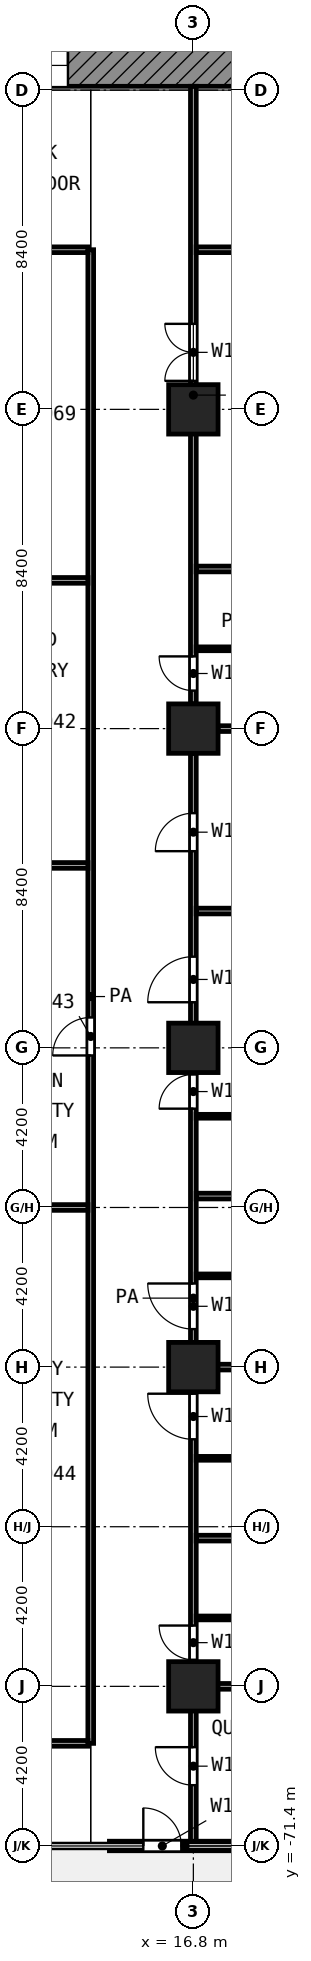
"""IFC4 building model, lengths in metres.
Left out: names, types, materials, properties, quantities, classifications, styles, units other than length and angle.
Written with IfcOpenShell. Run it as: python <this file> out.ifc"""

import sys

from ifc_helpers import new_model, si_unit, direction, frame, frame_2d, origin, origin_2d, place, context, subcontext, project, spatial, rectangle, extrude, element, fill, save


model = new_model("IFC4")
c1 = context("Model", 3, precision=1e-05, world=origin(), true_north=direction((0.0, 1.0)))
c2 = subcontext(c1, "Body", "Model", "MODEL_VIEW")
j1 = project(units=[si_unit("LENGTHUNIT", "METRE"), si_unit("PLANEANGLEUNIT", "RADIAN")], contexts=[c1])
p1 = place(None, origin())
s1 = spatial("IfcSite", under=j1, at=p1, CompositionType="ELEMENT")
p2 = place(p1, origin())
s2 = spatial("IfcBuilding", under=s1, at=p2, CompositionType="ELEMENT")
p3 = place(p2, frame((0.0, 0.0, 56.0)))
s3 = spatial("IfcBuildingStorey", under=s2, at=p3, CompositionType="ELEMENT", Elevation=56.0)
for number, where, z_axis, x_axis in (
    (1, (16.8, -33.6, 0.0), (0.0, 0.0, 1.0), (1.0, 0.0, 0.0)),
    (2, (16.8, -42.0, 0.0), (0.0, 0.0, 1.0), (1.0, 0.0, 0.0)),
    (3, (16.8, -50.4, 0.0), (0.0, 0.0, 1.0), (1.0, 0.0, 0.0)),
    (4, (16.8, -58.8, 0.0), (0.0, 0.0, 1.0), (1.0, 0.0, 0.0)),
    (5, (16.8, -67.2, 0.0), (0.0, 0.0, 1.0), (1.0, 0.0, 0.0)),
):
    element("IfcColumn", number, at=place(p3, frame(where, z_axis=z_axis, x_axis=x_axis)), inside=s3, PredefinedType="COLUMN", context=c2, shape_type="SweptSolid", body=[
        extrude(rectangle(XDim=1.3, YDim=1.3, at=origin_2d()), origin(), (0.0, 0.0, 1.0), 4.2),
    ])
p4 = place(p3, frame((14.592, -71.4, 0.0), z_axis=(0.0, 0.0, 1.0), x_axis=(1.0, 0.0, 0.0)))
e6 = element("IfcWall", 6, at=p4, inside=s3, PredefinedType="SOLIDWALL", context=c2, shape_type="SweptSolid", body=[
    extrude(rectangle(XDim=3.983, YDim=0.25, at=frame_2d((1.992, 0.0))), origin(), (0.0, 0.0, 1.0), 3.78),
])
p5 = place(p4, frame((0.892, 0.0, 0.0)))
e7 = element("IfcOpeningElement", 7, at=p5, cuts=e6, PredefinedType="OPENING", context=c2, shape_type="SweptSolid", body=[
    extrude(rectangle(XDim=1.0, YDim=2.1, at=frame_2d((0.5, 1.05))), frame((0.0, 0.135, 0.0), z_axis=(0.0, -1.0, 0.0), x_axis=(1.0, 0.0, 0.0)), (0.0, 0.0, 1.0), 0.27),
])
p6 = place(p3, frame((5.4, -24.55, 0.0), z_axis=(0.0, 0.0, 1.0), x_axis=(1.0, 0.0, 0.0)))
e8 = element("IfcWall", 8, at=p6, inside=s3, PredefinedType="SHEAR", context=c2, shape_type="SweptSolid", body=[
    extrude(rectangle(XDim=18.6, YDim=1.1, at=frame_2d((9.3, 0.0))), origin(), (0.0, 0.0, 1.0), 3.9),
])
p7 = place(p6, frame((6.3, 0.0, 0.0)))
e9 = element("IfcOpeningElement", 9, at=p7, cuts=e8, PredefinedType="OPENING", context=c2, shape_type="SweptSolid", body=[
    extrude(rectangle(XDim=1.8, YDim=2.1, at=frame_2d((0.9, 1.05))), frame((0.0, 0.56, 0.0), z_axis=(0.0, -1.0, 0.0), x_axis=(1.0, 0.0, 0.0)), (0.0, 0.0, 1.0), 1.12),
])
for number, where, z_axis, x_axis in (
    (10, (16.875, -65.4, 0.0), (0.0, 0.0, 1.0), (1.0, 0.0, 0.0)),
    (11, (16.875, -61.2, 0.0), (0.0, 0.0, 1.0), (1.0, 0.0, 0.0)),
):
    element("IfcWall", number, at=place(p3, frame(where, z_axis=z_axis, x_axis=x_axis)), inside=s3, PredefinedType="PARTITIONING", context=c2, shape_type="SweptSolid", body=[
        extrude(rectangle(XDim=2.575, YDim=0.1, at=frame_2d((1.288, 0.0))), origin(), (0.0, 0.0, 1.0), 3.9),
    ])
p8 = place(p3, frame((16.875, -56.4, 0.0), z_axis=(0.0, 0.0, 1.0), x_axis=(1.0, 0.0, 0.0)))
e12 = element("IfcWall", 12, at=p8, inside=s3, PredefinedType="PARTITIONING", context=c2, shape_type="SweptSolid", body=[
    extrude(rectangle(XDim=3.175, YDim=0.1, at=frame_2d((1.587, 0.0))), origin(), (0.0, 0.0, 1.0), 3.9),
])
p9 = place(p3, frame((16.875, -52.2, 0.0), z_axis=(0.0, 0.0, 1.0), x_axis=(1.0, 0.0, 0.0)))
e13 = element("IfcWall", 13, at=p9, inside=s3, PredefinedType="PARTITIONING", context=c2, shape_type="SweptSolid", body=[
    extrude(rectangle(XDim=2.574, YDim=0.1, at=frame_2d((1.287, 0.0))), origin(), (0.0, 0.0, 1.0), 3.9),
])
p10 = place(p3, frame((16.875, -39.9, 0.0), z_axis=(0.0, 0.0, 1.0), x_axis=(1.0, 0.0, 0.0)))
e14 = element("IfcWall", 14, at=p10, inside=s3, PredefinedType="PARTITIONING", context=c2, shape_type="SweptSolid", body=[
    extrude(rectangle(XDim=2.575, YDim=0.1, at=frame_2d((1.288, 0.0))), origin(), (0.0, 0.0, 1.0), 3.9),
])
p11 = place(p3, frame((11.175, -68.7, 0.0), z_axis=(0.0, 0.0, 1.0), x_axis=(1.0, 0.0, 0.0)))
e15 = element("IfcWall", 15, at=p11, inside=s3, PredefinedType="PARTITIONING", context=c2, shape_type="SweptSolid", body=[
    extrude(rectangle(XDim=2.85, YDim=0.15, at=frame_2d((1.425, 0.0))), origin(), (0.0, 0.0, 1.0), 3.9),
])
p12 = place(p3, frame((16.875, -67.2, 0.0), z_axis=(0.0, 0.0, 1.0), x_axis=(1.0, 0.0, 0.0)))
e16 = element("IfcWall", 16, at=p12, inside=s3, PredefinedType="PARTITIONING", context=c2, shape_type="SweptSolid", body=[
    extrude(rectangle(XDim=6.412, YDim=0.15, at=frame_2d((3.206, 0.0))), origin(), (0.0, 0.0, 1.0), 3.9),
])
for number, where, z_axis, x_axis in (
    (17, (16.875, -63.3, 0.0), (0.0, 0.0, 1.0), (1.0, 0.0, 0.0)),
    (18, (16.875, -58.8, 0.0), (0.0, 0.0, 1.0), (1.0, 0.0, 0.0)),
):
    element("IfcWall", number, at=place(p3, frame(where, z_axis=z_axis, x_axis=x_axis)), inside=s3, PredefinedType="PARTITIONING", context=c2, shape_type="SweptSolid", body=[
        extrude(rectangle(XDim=8.245, YDim=0.15, at=frame_2d((4.123, 0.0))), origin(), (0.0, 0.0, 1.0), 3.9),
    ])
p13 = place(p3, frame((11.175, -54.6, 0.0), z_axis=(0.0, 0.0, 1.0), x_axis=(1.0, 0.0, 0.0)))
e19 = element("IfcWall", 19, at=p13, inside=s3, PredefinedType="PARTITIONING", context=c2, shape_type="SweptSolid", body=[
    extrude(rectangle(XDim=2.85, YDim=0.15, at=frame_2d((1.425, 0.0))), origin(), (0.0, 0.0, 1.0), 3.9),
])
for number, where, z_axis, x_axis in (
    (20, (16.875, -54.3, 0.0), (0.0, 0.0, 1.0), (1.0, 0.0, 0.0)),
    (21, (16.875, -46.8, 0.0), (0.0, 0.0, 1.0), (1.0, 0.0, 0.0)),
):
    element("IfcWall", number, at=place(p3, frame(where, z_axis=z_axis, x_axis=x_axis)), inside=s3, PredefinedType="PARTITIONING", context=c2, shape_type="SweptSolid", body=[
        extrude(rectangle(XDim=8.245, YDim=0.15, at=frame_2d((4.123, 0.0))), origin(), (0.0, 0.0, 1.0), 3.9),
    ])
p14 = place(p3, frame((11.175, -45.6, 0.0), z_axis=(0.0, 0.0, 1.0), x_axis=(1.0, 0.0, 0.0)))
e22 = element("IfcWall", 22, at=p14, inside=s3, PredefinedType="PARTITIONING", context=c2, shape_type="SweptSolid", body=[
    extrude(rectangle(XDim=2.85, YDim=0.15, at=frame_2d((1.425, 0.0))), origin(), (0.0, 0.0, 1.0), 3.9),
])
p15 = place(p3, frame((17.45, -42.0, 0.0), z_axis=(0.0, 0.0, 1.0), x_axis=(1.0, 0.0, 0.0)))
e23 = element("IfcWall", 23, at=p15, inside=s3, PredefinedType="PARTITIONING", context=c2, shape_type="SweptSolid", body=[
    extrude(rectangle(XDim=7.15, YDim=0.15, at=frame_2d((3.575, 0.0))), origin(), (0.0, 0.0, 1.0), 3.9),
])
p16 = place(p3, frame((11.175, -38.1, 0.0), z_axis=(0.0, 0.0, 1.0), x_axis=(1.0, 0.0, 0.0)))
e24 = element("IfcWall", 24, at=p16, inside=s3, PredefinedType="PARTITIONING", context=c2, shape_type="SweptSolid", body=[
    extrude(rectangle(XDim=2.85, YDim=0.15, at=frame_2d((1.425, 0.0))), origin(), (0.0, 0.0, 1.0), 3.9),
])
p17 = place(p3, frame((16.875, -37.8, 0.0), z_axis=(0.0, 0.0, 1.0), x_axis=(1.0, 0.0, 0.0)))
e25 = element("IfcWall", 25, at=p17, inside=s3, PredefinedType="PARTITIONING", context=c2, shape_type="SweptSolid", body=[
    extrude(rectangle(XDim=8.245, YDim=0.15, at=frame_2d((4.123, 0.0))), origin(), (0.0, 0.0, 1.0), 3.9),
])
p18 = place(p3, frame((11.175, -29.4, 0.0), z_axis=(0.0, 0.0, 1.0), x_axis=(1.0, 0.0, 0.0)))
e26 = element("IfcWall", 26, at=p18, inside=s3, PredefinedType="PARTITIONING", context=c2, shape_type="SweptSolid", body=[
    extrude(rectangle(XDim=2.85, YDim=0.15, at=frame_2d((1.425, 0.0))), origin(), (0.0, 0.0, 1.0), 3.9),
])
p19 = place(p3, frame((16.875, -29.4, 0.0), z_axis=(0.0, 0.0, 1.0), x_axis=(1.0, 0.0, 0.0)))
e27 = element("IfcWall", 27, at=p19, inside=s3, PredefinedType="PARTITIONING", context=c2, shape_type="SweptSolid", body=[
    extrude(rectangle(XDim=8.25, YDim=0.15, at=frame_2d((4.125, 0.0))), origin(), (0.0, 0.0, 1.0), 3.9),
])
p20 = place(p3, frame((14.1, -68.7, 0.0), z_axis=(0.0, 0.0, 1.0), x_axis=(0.0, 1.0, 0.0)))
e28 = element("IfcWall", 28, at=p20, inside=s3, PredefinedType="PARTITIONING", context=c2, shape_type="SweptSolid", body=[
    extrude(rectangle(XDim=39.3, YDim=0.15, at=frame_2d((19.65, 0.0))), origin(), (0.0, 0.0, 1.0), 3.9),
])
p21 = place(p20, frame((18.1, 0.0, 0.0)))
e29 = element("IfcOpeningElement", 29, at=p21, cuts=e28, PredefinedType="OPENING", context=c2, shape_type="SweptSolid", body=[
    extrude(rectangle(XDim=1.0, YDim=2.1, at=frame_2d((0.5, 1.05))), frame((0.0, 0.085, 0.0), z_axis=(0.0, -1.0, 0.0), x_axis=(1.0, 0.0, 0.0)), (0.0, 0.0, 1.0), 0.17),
])
p22 = place(p3, frame((16.8, -71.32, 0.0), z_axis=(0.0, 0.0, 1.0), x_axis=(0.0, 1.0, 0.0)))
e30 = element("IfcWall", 30, at=p22, inside=s3, PredefinedType="PARTITIONING", context=c2, shape_type="SweptSolid", body=[
    extrude(rectangle(XDim=28.67, YDim=0.15, at=frame_2d((14.335, 0.0))), origin(), (0.0, 0.0, 1.0), 3.9),
])
p23 = place(p22, frame((26.095, 0.0, 0.0)))
e31 = element("IfcOpeningElement", 31, at=p23, cuts=e30, PredefinedType="OPENING", context=c2, shape_type="SweptSolid", body=[
    extrude(rectangle(XDim=1.0, YDim=2.1, at=frame_2d((0.5, 1.05))), frame((0.0, 0.085, 0.0), z_axis=(0.0, -1.0, 0.0), x_axis=(1.0, 0.0, 0.0)), (0.0, 0.0, 1.0), 0.17),
])
p24 = place(p22, frame((22.12, 0.0, 0.0)))
e32 = element("IfcOpeningElement", 32, at=p24, cuts=e30, PredefinedType="OPENING", context=c2, shape_type="SweptSolid", body=[
    extrude(rectangle(XDim=1.2, YDim=2.1, at=frame_2d((0.6, 1.05))), frame((0.0, 0.085, 0.0), z_axis=(0.0, -1.0, 0.0), x_axis=(1.0, 0.0, 0.0)), (0.0, 0.0, 1.0), 0.17),
])
p25 = place(p22, frame((19.32, 0.0, 0.0)))
e33 = element("IfcOpeningElement", 33, at=p25, cuts=e30, PredefinedType="OPENING", context=c2, shape_type="SweptSolid", body=[
    extrude(rectangle(XDim=0.9, YDim=2.1, at=frame_2d((0.45, 1.05))), frame((0.0, 0.085, 0.0), z_axis=(0.0, -1.0, 0.0), x_axis=(1.0, 0.0, 0.0)), (0.0, 0.0, 1.0), 0.17),
])
p26 = place(p22, frame((13.52, 0.0, 0.0)))
e34 = element("IfcOpeningElement", 34, at=p26, cuts=e30, PredefinedType="OPENING", context=c2, shape_type="SweptSolid", body=[
    extrude(rectangle(XDim=1.2, YDim=2.1, at=frame_2d((0.6, 1.05))), frame((0.0, 0.085, 0.0), z_axis=(0.0, -1.0, 0.0), x_axis=(1.0, 0.0, 0.0)), (0.0, 0.0, 1.0), 0.17),
])
p27 = place(p22, frame((10.62, 0.0, 0.0)))
e35 = element("IfcOpeningElement", 35, at=p27, cuts=e30, PredefinedType="OPENING", context=c2, shape_type="SweptSolid", body=[
    extrude(rectangle(XDim=1.2, YDim=2.1, at=frame_2d((0.6, 1.05))), frame((0.0, 0.085, 0.0), z_axis=(0.0, -1.0, 0.0), x_axis=(1.0, 0.0, 0.0)), (0.0, 0.0, 1.0), 0.17),
])
p28 = place(p22, frame((4.82, 0.0, 0.0)))
e36 = element("IfcOpeningElement", 36, at=p28, cuts=e30, PredefinedType="OPENING", context=c2, shape_type="SweptSolid", body=[
    extrude(rectangle(XDim=0.9, YDim=2.1, at=frame_2d((0.45, 1.05))), frame((0.0, 0.085, 0.0), z_axis=(0.0, -1.0, 0.0), x_axis=(1.0, 0.0, 0.0)), (0.0, 0.0, 1.0), 0.17),
])
p29 = place(p22, frame((1.52, 0.0, 0.0)))
e37 = element("IfcOpeningElement", 37, at=p29, cuts=e30, PredefinedType="OPENING", context=c2, shape_type="SweptSolid", body=[
    extrude(rectangle(XDim=1.0, YDim=2.1, at=frame_2d((0.5, 1.05))), frame((0.0, 0.085, 0.0), z_axis=(0.0, -1.0, 0.0), x_axis=(1.0, 0.0, 0.0)), (0.0, 0.0, 1.0), 0.17),
])
p30 = place(p3, frame((16.8, -41.35, 0.0), z_axis=(0.0, 0.0, 1.0), x_axis=(0.0, 1.0, 0.0)))
e38 = element("IfcWall", 38, at=p30, inside=s3, PredefinedType="PARTITIONING", context=c2, shape_type="SweptSolid", body=[
    extrude(rectangle(XDim=16.25, YDim=0.15, at=frame_2d((8.125, 0.0))), origin(), (0.0, 0.0, 1.0), 3.9),
])
p31 = place(p30, frame((8.5, 0.0, 0.0)))
e39 = element("IfcOpeningElement", 39, at=p31, cuts=e38, PredefinedType="OPENING", context=c2, shape_type="SweptSolid", body=[
    extrude(rectangle(XDim=1.5, YDim=2.1, at=frame_2d((0.75, 1.05))), frame((0.0, 0.085, 0.0), z_axis=(0.0, -1.0, 0.0), x_axis=(1.0, 0.0, 0.0)), (0.0, 0.0, 1.0), 0.17),
])
p32 = place(p30, frame((0.35, 0.0, 0.0)))
e40 = element("IfcOpeningElement", 40, at=p32, cuts=e38, PredefinedType="OPENING", context=c2, shape_type="SweptSolid", body=[
    extrude(rectangle(XDim=0.9, YDim=2.1, at=frame_2d((0.45, 1.05))), frame((0.0, 0.085, 0.0), z_axis=(0.0, -1.0, 0.0), x_axis=(1.0, 0.0, 0.0)), (0.0, 0.0, 1.0), 0.17),
])
p33 = place(p5, origin())
e41 = element("IfcDoor", 41, at=p33, inside=s3, OperationType="SINGLE_SWING_LEFT", PredefinedType="DOOR", context=c2, shape_type="SweptSolid", body=[
    extrude(rectangle(XDim=1.0, YDim=2.1, at=frame_2d((0.5, 1.05))), frame((0.0, 0.025, 0.0), z_axis=(0.0, -1.0, 0.0), x_axis=(1.0, 0.0, 0.0)), (0.0, 0.0, 1.0), 0.05),
])
fill(e7, e41)
p34 = place(p7, origin())
e42 = element("IfcDoor", 42, at=p34, inside=s3, OperationType="DOUBLE_DOOR_SINGLE_SWING", PredefinedType="DOOR", context=c2, shape_type="SweptSolid", body=[
    extrude(rectangle(XDim=1.8, YDim=2.1, at=frame_2d((0.9, 1.05))), frame((0.0, 0.025, 0.0), z_axis=(0.0, -1.0, 0.0), x_axis=(1.0, 0.0, 0.0)), (0.0, 0.0, 1.0), 0.05),
])
fill(e9, e42)
p35 = place(p21, origin())
e43 = element("IfcDoor", 43, at=p35, inside=s3, OperationType="SINGLE_SWING_LEFT", PredefinedType="DOOR", context=c2, shape_type="SweptSolid", body=[
    extrude(rectangle(XDim=1.0, YDim=2.1, at=frame_2d((0.5, 1.05))), frame((0.0, 0.025, 0.0), z_axis=(0.0, -1.0, 0.0), x_axis=(1.0, 0.0, 0.0)), (0.0, 0.0, 1.0), 0.05),
])
fill(e29, e43)
p36 = place(p31, origin())
e44 = element("IfcDoor", 44, at=p36, inside=s3, OperationType="DOUBLE_DOOR_SINGLE_SWING", PredefinedType="DOOR", context=c2, shape_type="SweptSolid", body=[
    extrude(rectangle(XDim=1.5, YDim=2.1, at=frame_2d((0.75, 1.05))), frame((0.0, 0.025, 0.0), z_axis=(0.0, -1.0, 0.0), x_axis=(1.0, 0.0, 0.0)), (0.0, 0.0, 1.0), 0.05),
])
fill(e39, e44)
p37 = place(p32, origin())
e45 = element("IfcDoor", 45, at=p37, inside=s3, OperationType="SINGLE_SWING_RIGHT", PredefinedType="DOOR", context=c2, shape_type="SweptSolid", body=[
    extrude(rectangle(XDim=0.9, YDim=2.1, at=frame_2d((0.45, 1.05))), frame((0.0, 0.025, 0.0), z_axis=(0.0, -1.0, 0.0), x_axis=(1.0, 0.0, 0.0)), (0.0, 0.0, 1.0), 0.05),
])
fill(e40, e45)
p38 = place(p23, origin())
e46 = element("IfcDoor", 46, at=p38, inside=s3, OperationType="SINGLE_SWING_LEFT", PredefinedType="DOOR", context=c2, shape_type="SweptSolid", body=[
    extrude(rectangle(XDim=1.0, YDim=2.1, at=frame_2d((0.5, 1.05))), frame((0.0, 0.025, 0.0), z_axis=(0.0, -1.0, 0.0), x_axis=(1.0, 0.0, 0.0)), (0.0, 0.0, 1.0), 0.05),
])
fill(e31, e46)
p39 = place(p24, origin())
e47 = element("IfcDoor", 47, at=p39, inside=s3, OperationType="SINGLE_SWING_LEFT", PredefinedType="DOOR", context=c2, shape_type="SweptSolid", body=[
    extrude(rectangle(XDim=1.2, YDim=2.1, at=frame_2d((0.6, 1.05))), frame((0.0, 0.025, 0.0), z_axis=(0.0, -1.0, 0.0), x_axis=(1.0, 0.0, 0.0)), (0.0, 0.0, 1.0), 0.05),
])
fill(e32, e47)
p40 = place(p25, origin())
e48 = element("IfcDoor", 48, at=p40, inside=s3, OperationType="SINGLE_SWING_LEFT", PredefinedType="DOOR", context=c2, shape_type="SweptSolid", body=[
    extrude(rectangle(XDim=0.9, YDim=2.1, at=frame_2d((0.45, 1.05))), frame((0.0, 0.025, 0.0), z_axis=(0.0, -1.0, 0.0), x_axis=(1.0, 0.0, 0.0)), (0.0, 0.0, 1.0), 0.05),
])
fill(e33, e48)
p41 = place(p26, origin())
e49 = element("IfcDoor", 49, at=p41, inside=s3, OperationType="SINGLE_SWING_RIGHT", PredefinedType="DOOR", context=c2, shape_type="SweptSolid", body=[
    extrude(rectangle(XDim=1.2, YDim=2.1, at=frame_2d((0.6, 1.05))), frame((0.0, 0.025, 0.0), z_axis=(0.0, -1.0, 0.0), x_axis=(1.0, 0.0, 0.0)), (0.0, 0.0, 1.0), 0.05),
])
fill(e34, e49)
p42 = place(p27, origin())
e50 = element("IfcDoor", 50, at=p42, inside=s3, OperationType="SINGLE_SWING_RIGHT", PredefinedType="DOOR", context=c2, shape_type="SweptSolid", body=[
    extrude(rectangle(XDim=1.2, YDim=2.1, at=frame_2d((0.6, 1.05))), frame((0.0, 0.025, 0.0), z_axis=(0.0, -1.0, 0.0), x_axis=(1.0, 0.0, 0.0)), (0.0, 0.0, 1.0), 0.05),
])
fill(e35, e50)
p43 = place(p28, origin())
e51 = element("IfcDoor", 51, at=p43, inside=s3, OperationType="SINGLE_SWING_RIGHT", PredefinedType="DOOR", context=c2, shape_type="SweptSolid", body=[
    extrude(rectangle(XDim=0.9, YDim=2.1, at=frame_2d((0.45, 1.05))), frame((0.0, 0.025, 0.0), z_axis=(0.0, -1.0, 0.0), x_axis=(1.0, 0.0, 0.0)), (0.0, 0.0, 1.0), 0.05),
])
fill(e36, e51)
p44 = place(p29, origin())
e52 = element("IfcDoor", 52, at=p44, inside=s3, OperationType="SINGLE_SWING_RIGHT", PredefinedType="DOOR", context=c2, shape_type="SweptSolid", body=[
    extrude(rectangle(XDim=1.0, YDim=2.1, at=frame_2d((0.5, 1.05))), frame((0.0, 0.025, 0.0), z_axis=(0.0, -1.0, 0.0), x_axis=(1.0, 0.0, 0.0)), (0.0, 0.0, 1.0), 0.05),
])
fill(e37, e52)
save(model, sys.argv[1])
